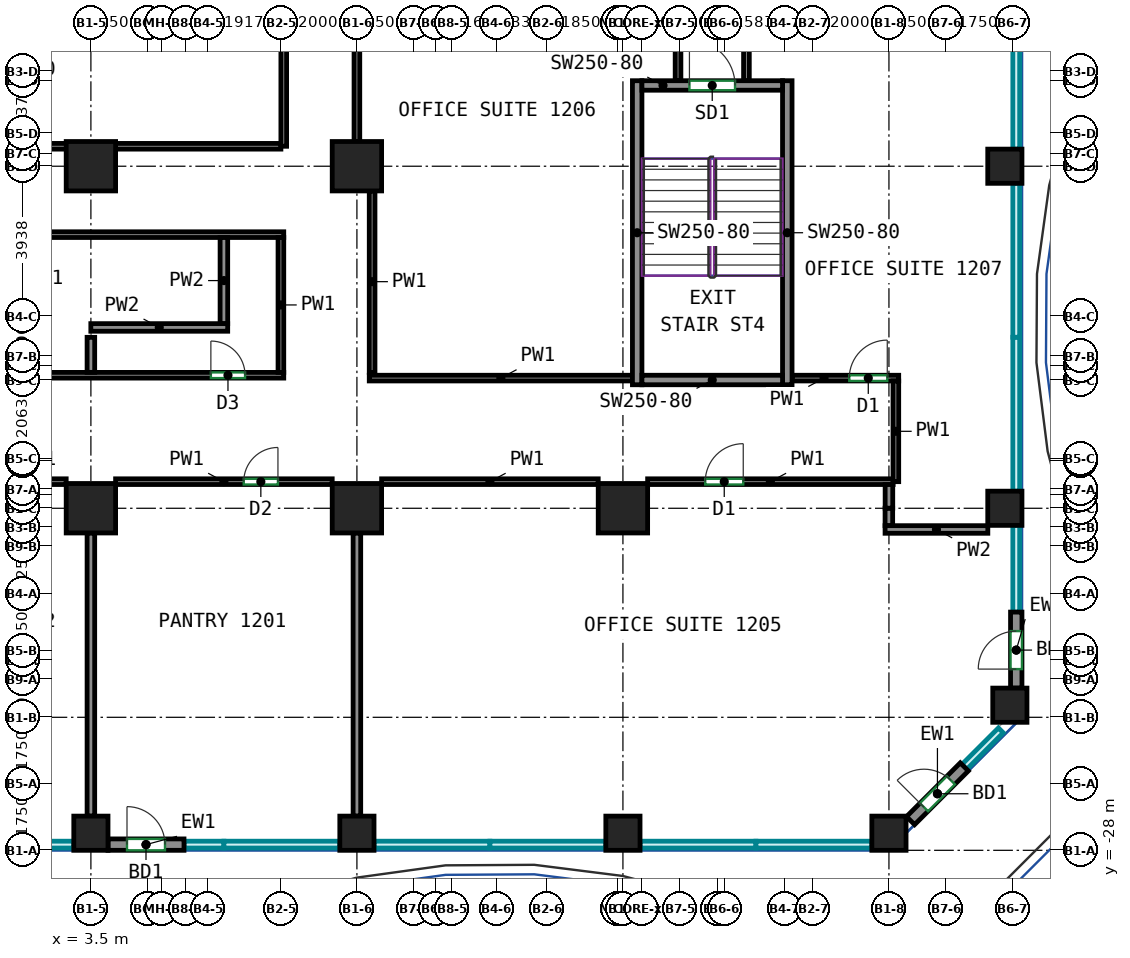
"""IFC4 building model, lengths in metres.
Left out: names, types, materials, properties, quantities, classifications, styles, units other than length and angle.
Written with IfcOpenShell. Run it as: python <this file> out.ifc"""

import sys

from ifc_helpers import new_model, si_unit, direction, frame, frame_2d, origin, origin_2d, place, context, subcontext, project, spatial, rectangle, extrude, source, transform, mapped, element, fill, save


model = new_model("IFC4")
c1 = context("Model", 3, precision=1e-05, world=origin(), true_north=direction((0.0, 1.0)))
c2 = subcontext(c1, "Body", "Model", "MODEL_VIEW")
j1 = project(units=[si_unit("LENGTHUNIT", "METRE"), si_unit("PLANEANGLEUNIT", "RADIAN")], contexts=[c1])
p1 = place(None, origin())
s1 = spatial("IfcSite", under=j1, at=p1, CompositionType="ELEMENT")
p2 = place(p1, origin())
s2 = spatial("IfcBuilding", under=s1, at=p2, CompositionType="ELEMENT")
p3 = place(p2, frame((0.0, 0.0, 55.0)))
s3 = spatial("IfcBuildingStorey", under=s2, at=p3, CompositionType="ELEMENT", Elevation=55.0)
m1 = source(origin(), c2, "Body", "SweptSolid", [
    extrude(rectangle(XDim=0.9, YDim=0.9, at=origin_2d()), origin(), (0.0, 0.0, 1.0), 3.6),
])
p4 = place(p3, frame((3.5, -27.55, 0.0), z_axis=(0.0, 0.0, 1.0), x_axis=(1.0, 0.0, 0.0)))
e1 = element("IfcColumn", 1, at=p4, inside=s3, PredefinedType="COLUMN", context=c2, shape_type="MappedRepresentation", body=[
    mapped(m1, transform((0.0, 0.0, 0.0))),
])
m2 = source(origin(), c2, "Body", "SweptSolid", [
    extrude(rectangle(XDim=1.3, YDim=1.3, at=origin_2d()), origin(), (0.0, 0.0, 1.0), 3.6),
])
for number, where, z_axis, x_axis in (
    (2, (3.5, -19.0, 0.0), (0.0, 0.0, 1.0), (1.0, 0.0, 0.0)),
    (3, (3.5, -10.0, 0.0), (0.0, 0.0, 1.0), (1.0, 0.0, 0.0)),
):
    element("IfcColumn", number, at=place(p3, frame(where, z_axis=z_axis, x_axis=x_axis)), inside=s3, PredefinedType="COLUMN", context=c2, shape_type="MappedRepresentation", body=[
        mapped(m2, transform((0.0, 0.0, 0.0))),
    ])
p5 = place(p3, frame((10.5, -27.55, 0.0), z_axis=(0.0, 0.0, 1.0), x_axis=(1.0, 0.0, 0.0)))
e4 = element("IfcColumn", 4, at=p5, inside=s3, PredefinedType="COLUMN", context=c2, shape_type="MappedRepresentation", body=[
    mapped(m1, transform((0.0, 0.0, 0.0))),
])
for number, where, z_axis, x_axis in (
    (5, (10.5, -19.0, 0.0), (0.0, 0.0, 1.0), (1.0, 0.0, 0.0)),
    (6, (10.5, -10.0, 0.0), (0.0, 0.0, 1.0), (1.0, 0.0, 0.0)),
):
    element("IfcColumn", number, at=place(p3, frame(where, z_axis=z_axis, x_axis=x_axis)), inside=s3, PredefinedType="COLUMN", context=c2, shape_type="MappedRepresentation", body=[
        mapped(m2, transform((0.0, 0.0, 0.0))),
    ])
p6 = place(p3, frame((17.5, -27.55, 0.0), z_axis=(0.0, 0.0, 1.0), x_axis=(1.0, 0.0, 0.0)))
e7 = element("IfcColumn", 7, at=p6, inside=s3, PredefinedType="COLUMN", context=c2, shape_type="MappedRepresentation", body=[
    mapped(m1, transform((0.0, 0.0, 0.0))),
])
p7 = place(p3, frame((17.5, -19.0, 0.0), z_axis=(0.0, 0.0, 1.0), x_axis=(1.0, 0.0, 0.0)))
e8 = element("IfcColumn", 8, at=p7, inside=s3, PredefinedType="COLUMN", context=c2, shape_type="MappedRepresentation", body=[
    mapped(m2, transform((0.0, 0.0, 0.0))),
])
for number, where, z_axis, x_axis in (
    (9, (24.5, -27.55, 0.0), (0.0, 0.0, 1.0), (1.0, 0.0, 0.0)),
    (10, (27.55, -19.0, 0.0), (0.0, 0.0, 1.0), (1.0, 0.0, 0.0)),
    (11, (27.55, -10.0, 0.0), (0.0, 0.0, 1.0), (1.0, 0.0, 0.0)),
    (12, (27.682, -24.182, 0.0), (0.0, 0.0, 1.0), (1.0, 0.0, 0.0)),
):
    element("IfcColumn", number, at=place(p3, frame(where, z_axis=z_axis, x_axis=x_axis)), inside=s3, PredefinedType="COLUMN", context=c2, shape_type="MappedRepresentation", body=[
        mapped(m1, transform((0.0, 0.0, 0.0))),
    ])
m3 = source(origin(), c2, "Body", "SweptSolid", [
    extrude(rectangle(XDim=8.0, YDim=0.25, at=frame_2d((4.0, 0.0))), origin(), (0.0, 0.0, 1.0), 3.6),
])
for number, where, z_axis, x_axis in (
    (13, (17.875, -15.75, 0.0), (0.0, 0.0, 1.0), (0.0, 1.0, 0.0)),
    (14, (21.825, -15.75, 0.0), (0.0, 0.0, 1.0), (0.0, 1.0, 0.0)),
):
    element("IfcWall", number, at=place(p3, frame(where, z_axis=z_axis, x_axis=x_axis)), inside=s3, PredefinedType="SHEAR", context=c2, shape_type="MappedRepresentation", body=[
        mapped(m3, transform((0.0, 0.0, 0.0))),
    ])
m4 = source(origin(), c2, "Body", "SweptSolid", [
    extrude(rectangle(XDim=3.7, YDim=0.25, at=frame_2d((1.85, 0.0))), origin(), (0.0, 0.0, 1.0), 3.6),
])
p8 = place(p3, frame((18.0, -15.625, 0.0), z_axis=(0.0, 0.0, 1.0), x_axis=(1.0, 0.0, 0.0)))
e15 = element("IfcWall", 15, at=p8, inside=s3, PredefinedType="SHEAR", context=c2, shape_type="MappedRepresentation", body=[
    mapped(m4, transform((0.0, 0.0, 0.0))),
])
p9 = place(p3, frame((18.0, -7.875, 0.0), z_axis=(0.0, 0.0, 1.0), x_axis=(1.0, 0.0, 0.0)))
e16 = element("IfcWall", 16, at=p9, inside=s3, PredefinedType="SHEAR", context=c2, shape_type="MappedRepresentation", body=[
    mapped(m4, transform((0.0, 0.0, 0.0))),
])
p10 = place(p9, frame((1.25, 0.0, 0.0)))
e17 = element("IfcOpeningElement", 17, at=p10, cuts=e16, PredefinedType="OPENING", context=c2, shape_type="SweptSolid", body=[
    extrude(rectangle(XDim=1.2, YDim=2.1, at=frame_2d((0.6, 1.05))), frame((0.0, 0.135, 0.0), z_axis=(0.0, -1.0, 0.0), x_axis=(1.0, 0.0, 0.0)), (0.0, 0.0, 1.0), 0.27),
])
m5 = source(origin(), c2, "Body", "SweptSolid", [
    extrude(rectangle(XDim=2.0, YDim=0.3, at=frame_2d((1.0, 0.0))), origin(), (0.0, 0.0, 1.0), 3.6),
])
p11 = place(p3, frame((3.95, -27.85, 0.0), z_axis=(0.0, 0.0, 1.0), x_axis=(1.0, 0.0, 0.0)))
e18 = element("IfcWall", 18, at=p11, inside=s3, PredefinedType="SOLIDWALL", context=c2, shape_type="MappedRepresentation", body=[
    mapped(m5, transform((0.0, 0.0, 0.0))),
])
p12 = place(p11, frame((0.5, 0.0, 0.0)))
e19 = element("IfcOpeningElement", 19, at=p12, cuts=e18, PredefinedType="OPENING", context=c2, shape_type="SweptSolid", body=[
    extrude(rectangle(XDim=1.0, YDim=2.1, at=frame_2d((0.5, 1.05))), frame((0.0, 0.16, 0.0), z_axis=(0.0, -1.0, 0.0), x_axis=(1.0, 0.0, 0.0)), (0.0, 0.0, 1.0), 0.32),
])
m6 = source(origin(), c2, "Body", "SweptSolid", [
    extrude(rectangle(XDim=2.0, YDim=0.3, at=frame_2d((1.0, 0.0))), origin(), (0.0, 0.0, 1.0), 3.6),
])
p13 = place(p3, frame((25.069, -27.219, 0.0), z_axis=(0.0, 0.0, 1.0), x_axis=(0.707106781187, 0.707106781187, 0.0)))
e20 = element("IfcWall", 20, at=p13, inside=s3, PredefinedType="SOLIDWALL", context=c2, shape_type="MappedRepresentation", body=[
    mapped(m6, transform((0.0, 0.0, 0.0))),
])
p14 = place(p13, frame((0.5, 0.0, 0.0)))
e21 = element("IfcOpeningElement", 21, at=p14, cuts=e20, PredefinedType="OPENING", context=c2, shape_type="SweptSolid", body=[
    extrude(rectangle(XDim=1.0, YDim=2.1, at=frame_2d((0.5, 1.05))), frame((0.0, 0.16, 0.0), z_axis=(0.0, -1.0, 0.0), x_axis=(1.0, 0.0, 0.0)), (0.0, 0.0, 1.0), 0.32),
])
p15 = place(p3, frame((27.85, -23.732, 0.0), z_axis=(0.0, 0.0, 1.0), x_axis=(0.0, 1.0, 0.0)))
e22 = element("IfcWall", 22, at=p15, inside=s3, PredefinedType="SOLIDWALL", context=c2, shape_type="MappedRepresentation", body=[
    mapped(m5, transform((0.0, 0.0, 0.0))),
])
p16 = place(p15, frame((0.5, 0.0, 0.0)))
e23 = element("IfcOpeningElement", 23, at=p16, cuts=e22, PredefinedType="OPENING", context=c2, shape_type="SweptSolid", body=[
    extrude(rectangle(XDim=1.0, YDim=2.1, at=frame_2d((0.5, 1.05))), frame((0.0, 0.16, 0.0), z_axis=(0.0, -1.0, 0.0), x_axis=(1.0, 0.0, 0.0)), (0.0, 0.0, 1.0), 0.32),
])
p17 = place(p3, frame((-6.575, -11.8, 0.0), z_axis=(0.0, 0.0, 1.0), x_axis=(1.0, 0.0, 0.0)))
e24 = element("IfcWall", 24, at=p17, inside=s3, PredefinedType="PARTITIONING", context=c2, shape_type="SweptSolid", body=[
    extrude(rectangle(XDim=15.15, YDim=0.15, at=frame_2d((7.575, 0.0))), origin(), (0.0, 0.0, 1.0), 3.6),
])
p18 = place(p17, frame((1.308, 0.0, 0.0)))
e25 = element("IfcOpeningElement", 25, at=p18, cuts=e24, PredefinedType="OPENING", context=c2, shape_type="SweptSolid", body=[
    extrude(rectangle(XDim=0.9, YDim=2.1, at=frame_2d((0.45, 1.05))), frame((0.0, 0.085, 0.0), z_axis=(0.0, -1.0, 0.0), x_axis=(1.0, 0.0, 0.0)), (0.0, 0.0, 1.0), 0.17),
])
p19 = place(p3, frame((-6.575, -15.5, 0.0), z_axis=(0.0, 0.0, 1.0), x_axis=(1.0, 0.0, 0.0)))
e26 = element("IfcWall", 26, at=p19, inside=s3, PredefinedType="PARTITIONING", context=c2, shape_type="SweptSolid", body=[
    extrude(rectangle(XDim=15.15, YDim=0.15, at=frame_2d((7.575, 0.0))), origin(), (0.0, 0.0, 1.0), 3.6),
])
p20 = place(p19, frame((13.232, 0.0, 0.0)))
e27 = element("IfcOpeningElement", 27, at=p20, cuts=e26, PredefinedType="OPENING", context=c2, shape_type="SweptSolid", body=[
    extrude(rectangle(XDim=0.9, YDim=2.1, at=frame_2d((0.45, 1.05))), frame((0.0, 0.085, 0.0), z_axis=(0.0, -1.0, 0.0), x_axis=(1.0, 0.0, 0.0)), (0.0, 0.0, 1.0), 0.17),
])
p21 = place(p3, frame((-2.85, -18.3, 0.0), z_axis=(0.0, 0.0, 1.0), x_axis=(1.0, 0.0, 0.0)))
e28 = element("IfcWall", 28, at=p21, inside=s3, PredefinedType="PARTITIONING", context=c2, shape_type="SweptSolid", body=[
    extrude(rectangle(XDim=5.7, YDim=0.15, at=frame_2d((2.85, 0.0))), origin(), (0.0, 0.0, 1.0), 3.6),
])
p22 = place(p21, frame((1.837, 0.0, 0.0)))
e29 = element("IfcOpeningElement", 29, at=p22, cuts=e28, PredefinedType="OPENING", context=c2, shape_type="SweptSolid", body=[
    extrude(rectangle(XDim=0.9, YDim=2.1, at=frame_2d((0.45, 1.05))), frame((0.0, 0.085, 0.0), z_axis=(0.0, -1.0, 0.0), x_axis=(1.0, 0.0, 0.0)), (0.0, 0.0, 1.0), 0.17),
])
p23 = place(p3, frame((4.15, -18.3, 0.0), z_axis=(0.0, 0.0, 1.0), x_axis=(1.0, 0.0, 0.0)))
e30 = element("IfcWall", 30, at=p23, inside=s3, PredefinedType="PARTITIONING", context=c2, shape_type="SweptSolid", body=[
    extrude(rectangle(XDim=5.7, YDim=0.15, at=frame_2d((2.85, 0.0))), origin(), (0.0, 0.0, 1.0), 3.6),
])
p24 = place(p23, frame((3.372, 0.0, 0.0)))
e31 = element("IfcOpeningElement", 31, at=p24, cuts=e30, PredefinedType="OPENING", context=c2, shape_type="SweptSolid", body=[
    extrude(rectangle(XDim=0.9, YDim=2.1, at=frame_2d((0.45, 1.05))), frame((0.0, 0.085, 0.0), z_axis=(0.0, -1.0, 0.0), x_axis=(1.0, 0.0, 0.0)), (0.0, 0.0, 1.0), 0.17),
])
p25 = place(p3, frame((8.5, -11.875, 0.0), z_axis=(0.0, 0.0, 1.0), x_axis=(0.0, -1.0, 0.0)))
e32 = element("IfcWall", 32, at=p25, inside=s3, PredefinedType="PARTITIONING", context=c2, shape_type="SweptSolid", body=[
    extrude(rectangle(XDim=3.55, YDim=0.15, at=frame_2d((1.775, 0.0))), origin(), (0.0, 0.0, 1.0), 3.6),
])
p26 = place(p3, frame((11.15, -18.3, 0.0), z_axis=(0.0, 0.0, 1.0), x_axis=(1.0, 0.0, 0.0)))
e33 = element("IfcWall", 33, at=p26, inside=s3, PredefinedType="PARTITIONING", context=c2, shape_type="SweptSolid", body=[
    extrude(rectangle(XDim=5.7, YDim=0.15, at=frame_2d((2.85, 0.0))), origin(), (0.0, 0.0, 1.0), 3.6),
])
p27 = place(p3, frame((18.15, -18.3, 0.0), z_axis=(0.0, 0.0, 1.0), x_axis=(1.0, 0.0, 0.0)))
e34 = element("IfcWall", 34, at=p27, inside=s3, PredefinedType="PARTITIONING", context=c2, shape_type="SweptSolid", body=[
    extrude(rectangle(XDim=6.46, YDim=0.15, at=frame_2d((3.23, 0.0))), origin(), (0.0, 0.0, 1.0), 3.6),
])
p28 = place(p27, frame((1.516, 0.0, 0.0)))
e35 = element("IfcOpeningElement", 35, at=p28, cuts=e34, PredefinedType="OPENING", context=c2, shape_type="SweptSolid", body=[
    extrude(rectangle(XDim=1.0, YDim=2.1, at=frame_2d((0.5, 1.05))), frame((0.0, 0.085, 0.0), z_axis=(0.0, -1.0, 0.0), x_axis=(1.0, 0.0, 0.0)), (0.0, 0.0, 1.0), 0.17),
])
p29 = place(p3, frame((10.5, -9.35, 0.0), z_axis=(0.0, 0.0, 1.0), x_axis=(0.0, 1.0, 0.0)))
e36 = element("IfcWall", 36, at=p29, inside=s3, PredefinedType="PARTITIONING", context=c2, shape_type="SweptSolid", body=[
    extrude(rectangle(XDim=7.7, YDim=0.15, at=frame_2d((3.85, 0.0))), origin(), (0.0, 0.0, 1.0), 2.95),
])
p30 = place(p29, frame((5.585, 0.0, 0.0)))
e37 = element("IfcOpeningElement", 37, at=p30, cuts=e36, PredefinedType="OPENING", context=c2, shape_type="SweptSolid", body=[
    extrude(rectangle(XDim=1.0, YDim=2.1, at=frame_2d((0.5, 1.05))), frame((0.0, 0.085, 0.0), z_axis=(0.0, -1.0, 0.0), x_axis=(1.0, 0.0, 0.0)), (0.0, 0.0, 1.0), 0.17),
])
p31 = place(p3, frame((10.9, -15.425, 0.0), z_axis=(0.0, 0.0, 1.0), x_axis=(0.0, 1.0, 0.0)))
e38 = element("IfcWall", 38, at=p31, inside=s3, PredefinedType="PARTITIONING", context=c2, shape_type="SweptSolid", body=[
    extrude(rectangle(XDim=4.775, YDim=0.15, at=frame_2d((2.388, 0.0))), origin(), (0.0, 0.0, 1.0), 3.6),
])
p32 = place(p3, frame((10.825, -15.575, 0.0), z_axis=(0.0, 0.0, 1.0), x_axis=(1.0, 0.0, 0.0)))
e39 = element("IfcWall", 39, at=p32, inside=s3, PredefinedType="PARTITIONING", context=c2, shape_type="SweptSolid", body=[
    extrude(rectangle(XDim=6.925, YDim=0.15, at=frame_2d((3.462, 0.0))), origin(), (0.0, 0.0, 1.0), 3.6),
])
p33 = place(p3, frame((18.95, -7.75, 0.0), z_axis=(0.0, 0.0, 1.0), x_axis=(0.0, 1.0, 0.0)))
e40 = element("IfcWall", 40, at=p33, inside=s3, PredefinedType="PARTITIONING", context=c2, shape_type="SweptSolid", body=[
    extrude(rectangle(XDim=6.66, YDim=0.15, at=frame_2d((3.33, 0.0))), origin(), (0.0, 0.0, 1.0), 3.6),
])
p34 = place(p3, frame((21.95, -15.575, 0.0), z_axis=(0.0, 0.0, 1.0), x_axis=(1.0, 0.0, 0.0)))
e41 = element("IfcWall", 41, at=p34, inside=s3, PredefinedType="PARTITIONING", context=c2, shape_type="SweptSolid", body=[
    extrude(rectangle(XDim=2.807, YDim=0.15, at=frame_2d((1.404, 0.0))), origin(), (0.0, 0.0, 1.0), 3.6),
])
p35 = place(p34, frame((1.506, 0.0, 0.0)))
e42 = element("IfcOpeningElement", 42, at=p35, cuts=e41, PredefinedType="OPENING", context=c2, shape_type="SweptSolid", body=[
    extrude(rectangle(XDim=1.0, YDim=2.1, at=frame_2d((0.5, 1.05))), frame((0.0, 0.085, 0.0), z_axis=(0.0, -1.0, 0.0), x_axis=(1.0, 0.0, 0.0)), (0.0, 0.0, 1.0), 0.17),
])
p36 = place(p3, frame((24.682, -18.3, 0.0), z_axis=(0.0, 0.0, 1.0), x_axis=(0.0, 1.0, 0.0)))
e43 = element("IfcWall", 43, at=p36, inside=s3, PredefinedType="PARTITIONING", context=c2, shape_type="SweptSolid", body=[
    extrude(rectangle(XDim=2.65, YDim=0.15, at=frame_2d((1.325, 0.0))), origin(), (0.0, 0.0, 1.0), 3.6),
])
p37 = place(p3, frame((20.75, -7.75, 0.0), z_axis=(0.0, 0.0, 1.0), x_axis=(0.0, 1.0, 0.0)))
e44 = element("IfcWall", 44, at=p37, inside=s3, PredefinedType="PARTITIONING", context=c2, shape_type="SweptSolid", body=[
    extrude(rectangle(XDim=13.35, YDim=0.15, at=frame_2d((6.675, 0.0))), origin(), (0.0, 0.0, 1.0), 3.6),
])
p38 = place(p37, frame((6.744, 0.0, 0.0)))
e45 = element("IfcOpeningElement", 45, at=p38, cuts=e44, PredefinedType="OPENING", context=c2, shape_type="SweptSolid", body=[
    extrude(rectangle(XDim=0.9, YDim=2.1, at=frame_2d((0.45, 1.05))), frame((0.0, 0.085, 0.0), z_axis=(0.0, -1.0, 0.0), x_axis=(1.0, 0.0, 0.0)), (0.0, 0.0, 1.0), 0.17),
])
p39 = place(p3, frame((7.0, -14.142, 0.0), z_axis=(0.0, 0.0, 1.0), x_axis=(0.0, 1.0, 0.0)))
e46 = element("IfcWall", 46, at=p39, inside=s3, PredefinedType="PARTITIONING", context=c2, shape_type="SweptSolid", body=[
    extrude(rectangle(XDim=2.266, YDim=0.2, at=frame_2d((1.133, 0.0))), origin(), (0.0, 0.0, 1.0), 3.6),
])
p40 = place(p3, frame((3.498, -14.242, 0.0), z_axis=(0.0, 0.0, 1.0), x_axis=(1.0, 0.0, 0.0)))
e47 = element("IfcWall", 47, at=p40, inside=s3, PredefinedType="PARTITIONING", context=c2, shape_type="SweptSolid", body=[
    extrude(rectangle(XDim=3.602, YDim=0.2, at=frame_2d((1.801, 0.0))), origin(), (0.0, 0.0, 1.0), 3.6),
])
p41 = place(p3, frame((3.5, -15.424, 0.0), z_axis=(0.0, 0.0, 1.0), x_axis=(0.0, 1.0, 0.0)))
e48 = element("IfcWall", 48, at=p41, inside=s3, PredefinedType="PARTITIONING", context=c2, shape_type="SweptSolid", body=[
    extrude(rectangle(XDim=0.922, YDim=0.2, at=frame_2d((0.461, 0.0))), origin(), (0.0, 0.0, 1.0), 2.95),
])
for number, where, z_axis, x_axis in (
    (49, (3.5, -27.1, 0.0), (0.0, 0.0, 1.0), (0.0, 1.0, 0.0)),
    (50, (10.5, -27.1, 0.0), (0.0, 0.0, 1.0), (0.0, 1.0, 0.0)),
):
    element("IfcWall", number, at=place(p3, frame(where, z_axis=z_axis, x_axis=x_axis)), inside=s3, PredefinedType="PARTITIONING", context=c2, shape_type="SweptSolid", body=[
        extrude(rectangle(XDim=7.45, YDim=0.2, at=frame_2d((3.725, 0.0))), origin(), (0.0, 0.0, 1.0), 2.95),
    ])
p42 = place(p3, frame((24.498, -19.458, 0.0), z_axis=(0.0, 0.0, 1.0), x_axis=(0.0, 1.0, 0.0)))
e51 = element("IfcWall", 51, at=p42, inside=s3, PredefinedType="PARTITIONING", context=c2, shape_type="SweptSolid", body=[
    extrude(rectangle(XDim=0.46, YDim=0.2, at=frame_2d((0.23, 0.0))), origin(), (0.0, 0.0, 1.0), 2.95),
])
p43 = place(p3, frame((27.102, -19.558, 0.0), z_axis=(0.0, 0.0, 1.0), x_axis=(-1.0, 0.0, 0.0)))
e52 = element("IfcWall", 52, at=p43, inside=s3, PredefinedType="PARTITIONING", context=c2, shape_type="SweptSolid", body=[
    extrude(rectangle(XDim=2.704, YDim=0.2, at=frame_2d((1.352, 0.0))), origin(), (0.0, 0.0, 1.0), 3.6),
])
p44 = place(p3, frame((24.5, -18.998, 0.0), z_axis=(0.0, 0.0, 1.0), x_axis=(0.0, 1.0, 0.0)))
e53 = element("IfcWall", 53, at=p44, inside=s3, PredefinedType="PARTITIONING", context=c2, shape_type="SweptSolid", body=[
    extrude(rectangle(XDim=0.622, YDim=0.2, at=frame_2d((0.311, 0.0))), origin(), (0.0, 0.0, 1.0), 2.95),
])
p45 = place(p3, frame((8.5, -9.475, 0.0), z_axis=(0.0, 0.0, 1.0), x_axis=(-1.0, 0.0, 0.0)))
e54 = element("IfcWall", 54, at=p45, inside=s3, PredefinedType="PARTITIONING", context=c2, shape_type="SweptSolid", body=[
    extrude(rectangle(XDim=15.075, YDim=0.15, at=frame_2d((7.538, 0.0))), origin(), (0.0, 0.0, 1.0), 3.6),
])
p46 = place(p3, frame((8.575, 5.675, 0.0), z_axis=(0.0, 0.0, 1.0), x_axis=(0.0, -1.0, 0.0)))
e55 = element("IfcWall", 55, at=p46, inside=s3, PredefinedType="PARTITIONING", context=c2, shape_type="SweptSolid", body=[
    extrude(rectangle(XDim=15.15, YDim=0.15, at=frame_2d((7.575, 0.0))), origin(), (0.0, 0.0, 1.0), 3.6),
])
p47 = place(p12, origin())
e56 = element("IfcDoor", 56, at=p47, inside=s3, OperationType="SINGLE_SWING_LEFT", PredefinedType="DOOR", context=c2, shape_type="SweptSolid", body=[
    extrude(rectangle(XDim=1.0, YDim=2.1, at=frame_2d((0.5, 1.05))), frame((0.0, 0.025, 0.0), z_axis=(0.0, -1.0, 0.0), x_axis=(1.0, 0.0, 0.0)), (0.0, 0.0, 1.0), 0.05),
])
fill(e19, e56)
p48 = place(p14, origin())
e57 = element("IfcDoor", 57, at=p48, inside=s3, OperationType="SINGLE_SWING_LEFT", PredefinedType="DOOR", context=c2, shape_type="SweptSolid", body=[
    extrude(rectangle(XDim=1.0, YDim=2.1, at=frame_2d((0.5, 1.05))), frame((0.0, 0.025, 0.0), z_axis=(0.0, -1.0, 0.0), x_axis=(1.0, 0.0, 0.0)), (0.0, 0.0, 1.0), 0.05),
])
fill(e21, e57)
p49 = place(p16, origin())
e58 = element("IfcDoor", 58, at=p49, inside=s3, OperationType="SINGLE_SWING_LEFT", PredefinedType="DOOR", context=c2, shape_type="SweptSolid", body=[
    extrude(rectangle(XDim=1.0, YDim=2.1, at=frame_2d((0.5, 1.05))), frame((0.0, 0.025, 0.0), z_axis=(0.0, -1.0, 0.0), x_axis=(1.0, 0.0, 0.0)), (0.0, 0.0, 1.0), 0.05),
])
fill(e23, e58)
p50 = place(p10, origin())
e59 = element("IfcDoor", 59, at=p50, inside=s3, OperationType="DOUBLE_DOOR_SINGLE_SWING", PredefinedType="DOOR", context=c2, shape_type="SweptSolid", body=[
    extrude(rectangle(XDim=1.2, YDim=2.1, at=frame_2d((0.6, 1.05))), frame((0.0, 0.025, 0.0), z_axis=(0.0, -1.0, 0.0), x_axis=(1.0, 0.0, 0.0)), (0.0, 0.0, 1.0), 0.05),
])
fill(e17, e59)
p51 = place(p24, origin())
e60 = element("IfcDoor", 60, at=p51, inside=s3, OperationType="SINGLE_SWING_RIGHT", PredefinedType="DOOR", context=c2, shape_type="SweptSolid", body=[
    extrude(rectangle(XDim=0.9, YDim=2.1, at=frame_2d((0.45, 1.05))), frame((0.0, 0.025, 0.0), z_axis=(0.0, -1.0, 0.0), x_axis=(1.0, 0.0, 0.0)), (0.0, 0.0, 1.0), 0.05),
])
fill(e31, e60)
p52 = place(p28, origin())
e61 = element("IfcDoor", 61, at=p52, inside=s3, OperationType="SINGLE_SWING_RIGHT", PredefinedType="DOOR", context=c2, shape_type="SweptSolid", body=[
    extrude(rectangle(XDim=1.0, YDim=2.1, at=frame_2d((0.5, 1.05))), frame((0.0, 0.025, 0.0), z_axis=(0.0, -1.0, 0.0), x_axis=(1.0, 0.0, 0.0)), (0.0, 0.0, 1.0), 0.05),
])
fill(e35, e61)
p53 = place(p35, origin())
e62 = element("IfcDoor", 62, at=p53, inside=s3, OperationType="SINGLE_SWING_RIGHT", PredefinedType="DOOR", context=c2, shape_type="SweptSolid", body=[
    extrude(rectangle(XDim=1.0, YDim=2.1, at=frame_2d((0.5, 1.05))), frame((0.0, 0.025, 0.0), z_axis=(0.0, -1.0, 0.0), x_axis=(1.0, 0.0, 0.0)), (0.0, 0.0, 1.0), 0.05),
])
fill(e42, e62)
p54 = place(p20, origin())
e63 = element("IfcDoor", 63, at=p54, inside=s3, OperationType="SINGLE_SWING_LEFT", PredefinedType="DOOR", context=c2, shape_type="SweptSolid", body=[
    extrude(rectangle(XDim=0.9, YDim=2.1, at=frame_2d((0.45, 1.05))), frame((0.0, 0.025, 0.0), z_axis=(0.0, -1.0, 0.0), x_axis=(1.0, 0.0, 0.0)), (0.0, 0.0, 1.0), 0.05),
])
fill(e27, e63)
save(model, sys.argv[1])
